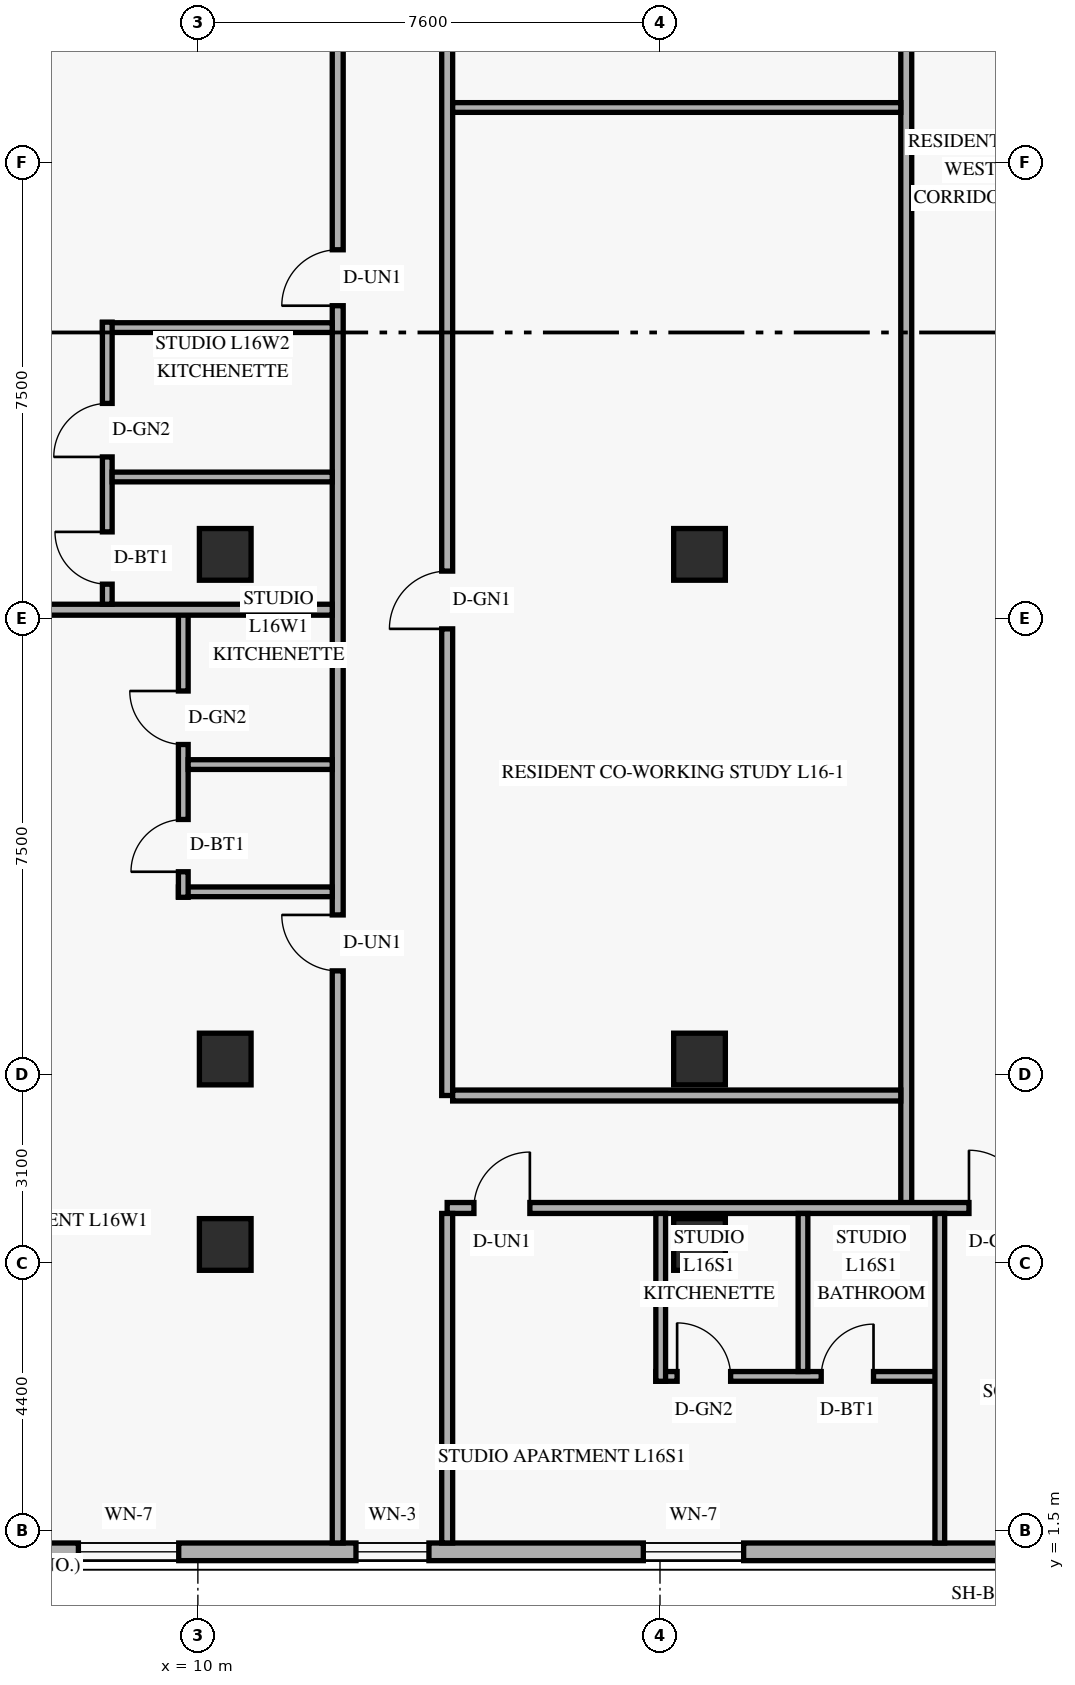
"""IFC4 building model, lengths in metres.
Left out: names, types, materials, properties, quantities, classifications, styles, units other than length and angle.
Written with IfcOpenShell. Run it as: python <this file> out.ifc"""

import sys

from ifc_helpers import new_model, si_unit, direction, frame, frame_2d, origin, origin_2d, place, context, subcontext, project, spatial, rectangle, extrude, element, fill, save


model = new_model("IFC4")
c1 = context("Model", 3, precision=1e-05, world=origin(), true_north=direction((0.0, 1.0)))
c2 = subcontext(c1, "Body", "Model", "MODEL_VIEW")
j1 = project(units=[si_unit("LENGTHUNIT", "METRE"), si_unit("PLANEANGLEUNIT", "RADIAN")], contexts=[c1])
p1 = place(None, origin())
s1 = spatial("IfcSite", under=j1, at=p1, CompositionType="ELEMENT")
p2 = place(p1, origin())
s2 = spatial("IfcBuilding", under=s1, at=p2, CompositionType="ELEMENT")
p3 = place(p2, frame((0.0, 0.0, 64.2)))
s3 = spatial("IfcBuildingStorey", under=s2, at=p3, CompositionType="ELEMENT", Elevation=64.2)
for number, where, z_axis, x_axis in (
    (1, (10.45, 6.2, 0.0), (0.0, 0.0, 1.0), (1.0, 0.0, 0.0)),
    (2, (10.45, 9.25, 0.0), (0.0, 0.0, 1.0), (1.0, 0.0, 0.0)),
    (3, (10.45, 17.55, 0.0), (0.0, 0.0, 1.0), (1.0, 0.0, 0.0)),
    (4, (18.25, 6.2, 0.0), (0.0, 0.0, 1.0), (1.0, 0.0, 0.0)),
    (5, (18.25, 9.25, 0.0), (0.0, 0.0, 1.0), (1.0, 0.0, 0.0)),
    (6, (18.25, 17.55, 0.0), (0.0, 0.0, 1.0), (1.0, 0.0, 0.0)),
):
    element("IfcColumn", number, at=place(p3, frame(where, z_axis=z_axis, x_axis=x_axis)), inside=s3, PredefinedType="COLUMN", context=c2, shape_type="SweptSolid", body=[
        extrude(rectangle(XDim=0.85, YDim=0.85, at=origin_2d()), origin(), (0.0, 0.0, 1.0), 3.6),
    ])
p4 = place(p3, frame((5.42, 1.145, 0.0), z_axis=(0.0, 0.0, 1.0), x_axis=(1.0, 0.0, 0.0)))
e7 = element("IfcWall", 7, at=p4, inside=s3, PredefinedType="SOLIDWALL", context=c2, shape_type="SweptSolid", body=[
    extrude(rectangle(XDim=39.56, YDim=0.29, at=frame_2d((19.78, 0.0))), origin(), (0.0, 0.0, 1.0), 3.36),
])
p5 = place(p4, frame((2.615, 0.0, 0.85)))
e8 = element("IfcOpeningElement", 8, at=p5, cuts=e7, PredefinedType="OPENING", context=c2, shape_type="SweptSolid", body=[
    extrude(rectangle(XDim=1.65, YDim=1.6, at=frame_2d((0.825, 0.8))), frame((0.0, 0.155, 0.0), z_axis=(0.0, -1.0, 0.0), x_axis=(1.0, 0.0, 0.0)), (0.0, 0.0, 1.0), 0.31),
])
p6 = place(p4, frame((7.18, 0.0, 0.85)))
e9 = element("IfcOpeningElement", 9, at=p6, cuts=e7, PredefinedType="OPENING", context=c2, shape_type="SweptSolid", body=[
    extrude(rectangle(XDim=1.2, YDim=1.5, at=frame_2d((0.6, 0.75))), frame((0.0, 0.155, 0.0), z_axis=(0.0, -1.0, 0.0), x_axis=(1.0, 0.0, 0.0)), (0.0, 0.0, 1.0), 0.31),
])
p7 = place(p4, frame((11.906, 0.0, 0.85)))
e10 = element("IfcOpeningElement", 10, at=p7, cuts=e7, PredefinedType="OPENING", context=c2, shape_type="SweptSolid", body=[
    extrude(rectangle(XDim=1.65, YDim=1.6, at=frame_2d((0.825, 0.8))), frame((0.0, 0.155, 0.0), z_axis=(0.0, -1.0, 0.0), x_axis=(1.0, 0.0, 0.0)), (0.0, 0.0, 1.0), 0.31),
])
p8 = place(p4, frame((18.515, 0.0, 0.85)))
e11 = element("IfcOpeningElement", 11, at=p8, cuts=e7, PredefinedType="OPENING", context=c2, shape_type="SweptSolid", body=[
    extrude(rectangle(XDim=1.65, YDim=1.6, at=frame_2d((0.825, 0.8))), frame((0.0, 0.155, 0.0), z_axis=(0.0, -1.0, 0.0), x_axis=(1.0, 0.0, 0.0)), (0.0, 0.0, 1.0), 0.31),
])
p9 = place(p4, frame((25.124, 0.0, 0.85)))
e12 = element("IfcOpeningElement", 12, at=p9, cuts=e7, PredefinedType="OPENING", context=c2, shape_type="SweptSolid", body=[
    extrude(rectangle(XDim=1.65, YDim=1.6, at=frame_2d((0.825, 0.8))), frame((0.0, 0.155, 0.0), z_axis=(0.0, -1.0, 0.0), x_axis=(1.0, 0.0, 0.0)), (0.0, 0.0, 1.0), 0.31),
])
p10 = place(p4, frame((30.465, 0.0, 0.85)))
e13 = element("IfcOpeningElement", 13, at=p10, cuts=e7, PredefinedType="OPENING", context=c2, shape_type="SweptSolid", body=[
    extrude(rectangle(XDim=1.2, YDim=1.5, at=frame_2d((0.6, 0.75))), frame((0.0, 0.155, 0.0), z_axis=(0.0, -1.0, 0.0), x_axis=(1.0, 0.0, 0.0)), (0.0, 0.0, 1.0), 0.31),
])
p11 = place(p4, frame((35.02, 0.0, 0.85)))
e14 = element("IfcOpeningElement", 14, at=p11, cuts=e7, PredefinedType="OPENING", context=c2, shape_type="SweptSolid", body=[
    extrude(rectangle(XDim=1.65, YDim=1.6, at=frame_2d((0.825, 0.8))), frame((0.0, 0.155, 0.0), z_axis=(0.0, -1.0, 0.0), x_axis=(1.0, 0.0, 0.0)), (0.0, 0.0, 1.0), 0.31),
])
p12 = place(p3, frame((21.65, 6.8, 0.0), z_axis=(0.0, 0.0, 1.0), x_axis=(0.0, 1.0, 0.0)))
e15 = element("IfcWall", 15, at=p12, inside=s3, PredefinedType="STANDARD", context=c2, shape_type="SweptSolid", body=[
    extrude(rectangle(XDim=34.4, YDim=0.18, at=frame_2d((17.2, 0.0))), origin(), (0.0, 0.0, 1.0), 2.649),
])
p13 = place(p3, frame((14.1, 6.8, 0.0), z_axis=(0.0, 0.0, 1.0), x_axis=(1.0, 0.0, 0.0)))
e16 = element("IfcWall", 16, at=p13, inside=s3, PredefinedType="STANDARD", context=c2, shape_type="SweptSolid", body=[
    extrude(rectangle(XDim=21.32, YDim=0.18, at=frame_2d((10.66, 0.0))), origin(), (0.0, 0.0, 1.0), 2.649),
])
p14 = place(p13, frame((0.44, 0.0, 0.0)))
e17 = element("IfcOpeningElement", 17, at=p14, cuts=e16, PredefinedType="OPENING", context=c2, shape_type="SweptSolid", body=[
    extrude(rectangle(XDim=0.92, YDim=2.15, at=frame_2d((0.46, 1.075))), frame((0.0, 0.1, 0.0), z_axis=(0.0, -1.0, 0.0), x_axis=(1.0, 0.0, 0.0)), (0.0, 0.0, 1.0), 0.2),
])
p15 = place(p13, frame((8.582, 0.0, 0.0)))
e18 = element("IfcOpeningElement", 18, at=p15, cuts=e16, PredefinedType="OPENING", context=c2, shape_type="SweptSolid", body=[
    extrude(rectangle(XDim=0.95, YDim=2.15, at=frame_2d((0.475, 1.075))), frame((0.0, 0.1, 0.0), z_axis=(0.0, -1.0, 0.0), x_axis=(1.0, 0.0, 0.0)), (0.0, 0.0, 1.0), 0.2),
])
p16 = place(p13, frame((13.658, 0.0, 0.0)))
e19 = element("IfcOpeningElement", 19, at=p16, cuts=e16, PredefinedType="OPENING", context=c2, shape_type="SweptSolid", body=[
    extrude(rectangle(XDim=0.92, YDim=2.15, at=frame_2d((0.46, 1.075))), frame((0.0, 0.1, 0.0), z_axis=(0.0, -1.0, 0.0), x_axis=(1.0, 0.0, 0.0)), (0.0, 0.0, 1.0), 0.2),
])
p17 = place(p3, frame((12.3, 1.29, 0.0), z_axis=(0.0, 0.0, 1.0), x_axis=(0.0, 1.0, 0.0)))
e20 = element("IfcWall", 20, at=p17, inside=s3, PredefinedType="STANDARD", context=c2, shape_type="SweptSolid", body=[
    extrude(rectangle(XDim=45.42, YDim=0.18, at=frame_2d((22.71, 0.0))), origin(), (0.0, 0.0, 1.0), 2.649),
])
p18 = place(p17, frame((9.41, 0.0, 0.0)))
e21 = element("IfcOpeningElement", 21, at=p18, cuts=e20, PredefinedType="OPENING", context=c2, shape_type="SweptSolid", body=[
    extrude(rectangle(XDim=0.92, YDim=2.15, at=frame_2d((0.46, 1.075))), frame((0.0, 0.1, 0.0), z_axis=(0.0, -1.0, 0.0), x_axis=(1.0, 0.0, 0.0)), (0.0, 0.0, 1.0), 0.2),
])
p19 = place(p17, frame((20.35, 0.0, 0.0)))
e22 = element("IfcOpeningElement", 22, at=p19, cuts=e20, PredefinedType="OPENING", context=c2, shape_type="SweptSolid", body=[
    extrude(rectangle(XDim=0.92, YDim=2.15, at=frame_2d((0.46, 1.075))), frame((0.0, 0.1, 0.0), z_axis=(0.0, -1.0, 0.0), x_axis=(1.0, 0.0, 0.0)), (0.0, 0.0, 1.0), 0.2),
])
p20 = place(p17, frame((35.99, 0.0, 0.0)))
e23 = element("IfcOpeningElement", 23, at=p20, cuts=e20, PredefinedType="OPENING", context=c2, shape_type="SweptSolid", body=[
    extrude(rectangle(XDim=0.92, YDim=2.15, at=frame_2d((0.46, 1.075))), frame((0.0, 0.1, 0.0), z_axis=(0.0, -1.0, 0.0), x_axis=(1.0, 0.0, 0.0)), (0.0, 0.0, 1.0), 0.2),
])
p21 = place(p3, frame((14.1, 8.65, 0.0), z_axis=(0.0, 0.0, 1.0), x_axis=(0.0, 1.0, 0.0)))
e24 = element("IfcWall", 24, at=p21, inside=s3, PredefinedType="STANDARD", context=c2, shape_type="SweptSolid", body=[
    extrude(rectangle(XDim=30.7, YDim=0.18, at=frame_2d((15.35, 0.0))), origin(), (0.0, 0.0, 1.0), 2.649),
])
p22 = place(p21, frame((7.675, 0.0, 0.0)))
e25 = element("IfcOpeningElement", 25, at=p22, cuts=e24, PredefinedType="OPENING", context=c2, shape_type="SweptSolid", body=[
    extrude(rectangle(XDim=0.95, YDim=2.15, at=frame_2d((0.475, 1.075))), frame((0.0, 0.1, 0.0), z_axis=(0.0, -1.0, 0.0), x_axis=(1.0, 0.0, 0.0)), (0.0, 0.0, 1.0), 0.2),
])
p23 = place(p21, frame((23.025, 0.0, 0.0)))
e26 = element("IfcOpeningElement", 26, at=p23, cuts=e24, PredefinedType="OPENING", context=c2, shape_type="SweptSolid", body=[
    extrude(rectangle(XDim=0.95, YDim=2.15, at=frame_2d((0.475, 1.075))), frame((0.0, 0.1, 0.0), z_axis=(0.0, -1.0, 0.0), x_axis=(1.0, 0.0, 0.0)), (0.0, 0.0, 1.0), 0.2),
])
p24 = place(p3, frame((14.19, 8.65, 0.0), z_axis=(0.0, 0.0, 1.0), x_axis=(1.0, 0.0, 0.0)))
e27 = element("IfcWall", 27, at=p24, inside=s3, PredefinedType="STANDARD", context=c2, shape_type="SweptSolid", body=[
    extrude(rectangle(XDim=7.37, YDim=0.18, at=frame_2d((3.685, 0.0))), origin(), (0.0, 0.0, 1.0), 2.649),
])
p25 = place(p3, frame((14.1, 1.29, 0.0), z_axis=(0.0, 0.0, 1.0), x_axis=(0.0, 1.0, 0.0)))
e28 = element("IfcWall", 28, at=p25, inside=s3, PredefinedType="PARTITIONING", context=c2, shape_type="SweptSolid", body=[
    extrude(rectangle(XDim=5.42, YDim=0.18, at=frame_2d((2.71, 0.0))), origin(), (0.0, 0.0, 1.0), 2.809),
])
p26 = place(p3, frame((9.68, 12.0, 0.0), z_axis=(0.0, 0.0, 1.0), x_axis=(1.0, 0.0, 0.0)))
e29 = element("IfcWall", 29, at=p26, inside=s3, PredefinedType="PLUMBINGWALL", context=c2, shape_type="SweptSolid", body=[
    extrude(rectangle(XDim=2.53, YDim=0.16, at=frame_2d((1.265, 0.0))), origin(), (0.0, 0.0, 1.0), 2.649),
])
p27 = place(p3, frame((9.76, 11.91, 0.0), z_axis=(0.0, 0.0, 1.0), x_axis=(0.0, 1.0, 0.0)))
e30 = element("IfcWall", 30, at=p27, inside=s3, PredefinedType="PLUMBINGWALL", context=c2, shape_type="SweptSolid", body=[
    extrude(rectangle(XDim=4.73, YDim=0.16, at=frame_2d((2.365, 0.0))), origin(), (0.0, 0.0, 1.0), 2.932),
])
p28 = place(p27, frame((0.42, 0.0, 0.0)))
e31 = element("IfcOpeningElement", 31, at=p28, cuts=e30, PredefinedType="OPENING", context=c2, shape_type="SweptSolid", body=[
    extrude(rectangle(XDim=0.86, YDim=2.12, at=frame_2d((0.43, 1.06))), frame((0.0, 0.09, 0.0), z_axis=(0.0, -1.0, 0.0), x_axis=(1.0, 0.0, 0.0)), (0.0, 0.0, 1.0), 0.18),
])
p29 = place(p27, frame((2.513, 0.0, 0.0)))
e32 = element("IfcOpeningElement", 32, at=p29, cuts=e30, PredefinedType="OPENING", context=c2, shape_type="SweptSolid", body=[
    extrude(rectangle(XDim=0.88, YDim=2.12, at=frame_2d((0.44, 1.06))), frame((0.0, 0.09, 0.0), z_axis=(0.0, -1.0, 0.0), x_axis=(1.0, 0.0, 0.0)), (0.0, 0.0, 1.0), 0.18),
])
p30 = place(p3, frame((9.84, 14.093, 0.0), z_axis=(0.0, 0.0, 1.0), x_axis=(1.0, 0.0, 0.0)))
e33 = element("IfcWall", 33, at=p30, inside=s3, PredefinedType="PLUMBINGWALL", context=c2, shape_type="SweptSolid", body=[
    extrude(rectangle(XDim=2.37, YDim=0.16, at=frame_2d((1.185, 0.0))), origin(), (0.0, 0.0, 1.0), 2.649),
])
p31 = place(p3, frame((2.09, 16.64, 0.0), z_axis=(0.0, 0.0, 1.0), x_axis=(1.0, 0.0, 0.0)))
e34 = element("IfcWall", 34, at=p31, inside=s3, PredefinedType="PARTITIONING", context=c2, shape_type="SweptSolid", body=[
    extrude(rectangle(XDim=10.12, YDim=0.18, at=frame_2d((5.06, 0.0))), origin(), (0.0, 0.0, 1.0), 2.649),
])
p32 = place(p3, frame((8.43, 21.28, 0.0), z_axis=(0.0, 0.0, 1.0), x_axis=(1.0, 0.0, 0.0)))
e35 = element("IfcWall", 35, at=p32, inside=s3, PredefinedType="PLUMBINGWALL", context=c2, shape_type="SweptSolid", body=[
    extrude(rectangle(XDim=3.78, YDim=0.16, at=frame_2d((1.89, 0.0))), origin(), (0.0, 0.0, 1.0), 2.649),
])
p33 = place(p3, frame((8.51, 16.73, 0.0), z_axis=(0.0, 0.0, 1.0), x_axis=(0.0, 1.0, 0.0)))
e36 = element("IfcWall", 36, at=p33, inside=s3, PredefinedType="PLUMBINGWALL", context=c2, shape_type="SweptSolid", body=[
    extrude(rectangle(XDim=4.64, YDim=0.16, at=frame_2d((2.32, 0.0))), origin(), (0.0, 0.0, 1.0), 2.649),
])
p34 = place(p33, frame((0.33, 0.0, 0.0)))
e37 = element("IfcOpeningElement", 37, at=p34, cuts=e36, PredefinedType="OPENING", context=c2, shape_type="SweptSolid", body=[
    extrude(rectangle(XDim=0.86, YDim=2.12, at=frame_2d((0.43, 1.06))), frame((0.0, 0.09, 0.0), z_axis=(0.0, -1.0, 0.0), x_axis=(1.0, 0.0, 0.0)), (0.0, 0.0, 1.0), 0.18),
])
p35 = place(p33, frame((2.423, 0.0, 0.0)))
e38 = element("IfcOpeningElement", 38, at=p35, cuts=e36, PredefinedType="OPENING", context=c2, shape_type="SweptSolid", body=[
    extrude(rectangle(XDim=0.88, YDim=2.12, at=frame_2d((0.44, 1.06))), frame((0.0, 0.09, 0.0), z_axis=(0.0, -1.0, 0.0), x_axis=(1.0, 0.0, 0.0)), (0.0, 0.0, 1.0), 0.18),
])
p36 = place(p3, frame((8.59, 18.823, 0.0), z_axis=(0.0, 0.0, 1.0), x_axis=(1.0, 0.0, 0.0)))
e39 = element("IfcWall", 39, at=p36, inside=s3, PredefinedType="PLUMBINGWALL", context=c2, shape_type="SweptSolid", body=[
    extrude(rectangle(XDim=3.62, YDim=0.16, at=frame_2d((1.81, 0.0))), origin(), (0.0, 0.0, 1.0), 2.649),
])
p37 = place(p3, frame((14.19, 24.9, 0.0), z_axis=(0.0, 0.0, 1.0), x_axis=(1.0, 0.0, 0.0)))
e40 = element("IfcWall", 40, at=p37, inside=s3, PredefinedType="PARTITIONING", context=c2, shape_type="SweptSolid", body=[
    extrude(rectangle(XDim=7.37, YDim=0.16, at=frame_2d((3.685, 0.0))), origin(), (0.0, 0.0, 1.0), 2.649),
])
p38 = place(p3, frame((17.531, 4.03, 0.0), z_axis=(0.0, 0.0, 1.0), x_axis=(1.0, 0.0, 0.0)))
e41 = element("IfcWall", 41, at=p38, inside=s3, PredefinedType="PLUMBINGWALL", context=c2, shape_type="SweptSolid", body=[
    extrude(rectangle(XDim=4.67, YDim=0.16, at=frame_2d((2.335, 0.0))), origin(), (0.0, 0.0, 1.0), 3.36),
])
p39 = place(p38, frame((0.35, 0.0, 0.0)))
e42 = element("IfcOpeningElement", 42, at=p39, cuts=e41, PredefinedType="OPENING", context=c2, shape_type="SweptSolid", body=[
    extrude(rectangle(XDim=0.88, YDim=2.12, at=frame_2d((0.44, 1.06))), frame((0.0, 0.09, 0.0), z_axis=(0.0, -1.0, 0.0), x_axis=(1.0, 0.0, 0.0)), (0.0, 0.0, 1.0), 0.18),
])
p40 = place(p38, frame((2.72, 0.0, 0.0)))
e43 = element("IfcOpeningElement", 43, at=p40, cuts=e41, PredefinedType="OPENING", context=c2, shape_type="SweptSolid", body=[
    extrude(rectangle(XDim=0.86, YDim=2.12, at=frame_2d((0.43, 1.06))), frame((0.0, 0.09, 0.0), z_axis=(0.0, -1.0, 0.0), x_axis=(1.0, 0.0, 0.0)), (0.0, 0.0, 1.0), 0.18),
])
p41 = place(p3, frame((17.612, 3.95, 0.0), z_axis=(0.0, 0.0, 1.0), x_axis=(0.0, 1.0, 0.0)))
e44 = element("IfcWall", 44, at=p41, inside=s3, PredefinedType="PLUMBINGWALL", context=c2, shape_type="SweptSolid", body=[
    extrude(rectangle(XDim=2.76, YDim=0.16, at=frame_2d((1.38, 0.0))), origin(), (0.0, 0.0, 1.0), 2.809),
])
p42 = place(p3, frame((19.952, 4.11, 0.0), z_axis=(0.0, 0.0, 1.0), x_axis=(0.0, 1.0, 0.0)))
e45 = element("IfcWall", 45, at=p42, inside=s3, PredefinedType="PLUMBINGWALL", context=c2, shape_type="SweptSolid", body=[
    extrude(rectangle(XDim=2.6, YDim=0.16, at=frame_2d((1.3, 0.0))), origin(), (0.0, 0.0, 1.0), 2.809),
])
p43 = place(p3, frame((22.202, 1.29, 0.0), z_axis=(0.0, 0.0, 1.0), x_axis=(0.0, 1.0, 0.0)))
e46 = element("IfcWall", 46, at=p43, inside=s3, PredefinedType="PARTITIONING", context=c2, shape_type="SweptSolid", body=[
    extrude(rectangle(XDim=5.42, YDim=0.16, at=frame_2d((2.71, 0.0))), origin(), (0.0, 0.0, 1.0), 2.809),
])
p44 = place(p5, origin())
e47 = element("IfcWindow", 47, at=p44, inside=s3, PartitioningType="SINGLE_PANEL", PredefinedType="WINDOW", context=c2, shape_type="SweptSolid", body=[
    extrude(rectangle(XDim=1.65, YDim=1.6, at=frame_2d((0.825, 0.8))), frame((0.0, 0.03, 0.0), z_axis=(0.0, -1.0, 0.0), x_axis=(1.0, 0.0, 0.0)), (0.0, 0.0, 1.0), 0.06),
])
fill(e8, e47)
p45 = place(p6, origin())
e48 = element("IfcWindow", 48, at=p45, inside=s3, PartitioningType="SINGLE_PANEL", PredefinedType="WINDOW", context=c2, shape_type="SweptSolid", body=[
    extrude(rectangle(XDim=1.2, YDim=1.5, at=frame_2d((0.6, 0.75))), frame((0.0, 0.03, 0.0), z_axis=(0.0, -1.0, 0.0), x_axis=(1.0, 0.0, 0.0)), (0.0, 0.0, 1.0), 0.06),
])
fill(e9, e48)
p46 = place(p7, origin())
e49 = element("IfcWindow", 49, at=p46, inside=s3, PartitioningType="SINGLE_PANEL", PredefinedType="WINDOW", context=c2, shape_type="SweptSolid", body=[
    extrude(rectangle(XDim=1.65, YDim=1.6, at=frame_2d((0.825, 0.8))), frame((0.0, 0.03, 0.0), z_axis=(0.0, -1.0, 0.0), x_axis=(1.0, 0.0, 0.0)), (0.0, 0.0, 1.0), 0.06),
])
fill(e10, e49)
p47 = place(p18, origin())
e50 = element("IfcDoor", 50, at=p47, inside=s3, OperationType="SINGLE_SWING_RIGHT", PredefinedType="DOOR", context=c2, shape_type="SweptSolid", body=[
    extrude(rectangle(XDim=0.92, YDim=2.15, at=frame_2d((0.46, 1.075))), frame((0.0, 0.025, 0.0), z_axis=(0.0, -1.0, 0.0), x_axis=(1.0, 0.0, 0.0)), (0.0, 0.0, 1.0), 0.05),
])
fill(e21, e50)
p48 = place(p28, origin())
e51 = element("IfcDoor", 51, at=p48, inside=s3, OperationType="SINGLE_SWING_LEFT", PredefinedType="DOOR", context=c2, shape_type="SweptSolid", body=[
    extrude(rectangle(XDim=0.86, YDim=2.12, at=frame_2d((0.43, 1.06))), frame((0.0, 0.025, 0.0), z_axis=(0.0, -1.0, 0.0), x_axis=(1.0, 0.0, 0.0)), (0.0, 0.0, 1.0), 0.05),
])
fill(e31, e51)
p49 = place(p29, origin())
e52 = element("IfcDoor", 52, at=p49, inside=s3, OperationType="SINGLE_SWING_RIGHT", PredefinedType="DOOR", context=c2, shape_type="SweptSolid", body=[
    extrude(rectangle(XDim=0.88, YDim=2.12, at=frame_2d((0.44, 1.06))), frame((0.0, 0.025, 0.0), z_axis=(0.0, -1.0, 0.0), x_axis=(1.0, 0.0, 0.0)), (0.0, 0.0, 1.0), 0.05),
])
fill(e32, e52)
p50 = place(p19, origin())
e53 = element("IfcDoor", 53, at=p50, inside=s3, OperationType="SINGLE_SWING_LEFT", PredefinedType="DOOR", context=c2, shape_type="SweptSolid", body=[
    extrude(rectangle(XDim=0.92, YDim=2.15, at=frame_2d((0.46, 1.075))), frame((0.0, 0.025, 0.0), z_axis=(0.0, -1.0, 0.0), x_axis=(1.0, 0.0, 0.0)), (0.0, 0.0, 1.0), 0.05),
])
fill(e22, e53)
p51 = place(p34, origin())
e54 = element("IfcDoor", 54, at=p51, inside=s3, OperationType="SINGLE_SWING_RIGHT", PredefinedType="DOOR", context=c2, shape_type="SweptSolid", body=[
    extrude(rectangle(XDim=0.86, YDim=2.12, at=frame_2d((0.43, 1.06))), frame((0.0, 0.025, 0.0), z_axis=(0.0, -1.0, 0.0), x_axis=(1.0, 0.0, 0.0)), (0.0, 0.0, 1.0), 0.05),
])
fill(e37, e54)
p52 = place(p35, origin())
e55 = element("IfcDoor", 55, at=p52, inside=s3, OperationType="SINGLE_SWING_LEFT", PredefinedType="DOOR", context=c2, shape_type="SweptSolid", body=[
    extrude(rectangle(XDim=0.88, YDim=2.12, at=frame_2d((0.44, 1.06))), frame((0.0, 0.025, 0.0), z_axis=(0.0, -1.0, 0.0), x_axis=(1.0, 0.0, 0.0)), (0.0, 0.0, 1.0), 0.05),
])
fill(e38, e55)
p53 = place(p22, origin())
e56 = element("IfcDoor", 56, at=p53, inside=s3, OperationType="SINGLE_SWING_LEFT", PredefinedType="DOOR", context=c2, shape_type="SweptSolid", body=[
    extrude(rectangle(XDim=0.95, YDim=2.15, at=frame_2d((0.475, 1.075))), frame((0.0, 0.025, 0.0), z_axis=(0.0, -1.0, 0.0), x_axis=(1.0, 0.0, 0.0)), (0.0, 0.0, 1.0), 0.05),
])
fill(e25, e56)
p54 = place(p14, origin())
e57 = element("IfcDoor", 57, at=p54, inside=s3, OperationType="SINGLE_SWING_RIGHT", PredefinedType="DOOR", context=c2, shape_type="SweptSolid", body=[
    extrude(rectangle(XDim=0.92, YDim=2.15, at=frame_2d((0.46, 1.075))), frame((0.0, 0.025, 0.0), z_axis=(0.0, -1.0, 0.0), x_axis=(1.0, 0.0, 0.0)), (0.0, 0.0, 1.0), 0.05),
])
fill(e17, e57)
p55 = place(p39, origin())
e58 = element("IfcDoor", 58, at=p55, inside=s3, OperationType="SINGLE_SWING_LEFT", PredefinedType="DOOR", context=c2, shape_type="SweptSolid", body=[
    extrude(rectangle(XDim=0.88, YDim=2.12, at=frame_2d((0.44, 1.06))), frame((0.0, 0.025, 0.0), z_axis=(0.0, -1.0, 0.0), x_axis=(1.0, 0.0, 0.0)), (0.0, 0.0, 1.0), 0.05),
])
fill(e42, e58)
p56 = place(p40, origin())
e59 = element("IfcDoor", 59, at=p56, inside=s3, OperationType="SINGLE_SWING_RIGHT", PredefinedType="DOOR", context=c2, shape_type="SweptSolid", body=[
    extrude(rectangle(XDim=0.86, YDim=2.12, at=frame_2d((0.43, 1.06))), frame((0.0, 0.025, 0.0), z_axis=(0.0, -1.0, 0.0), x_axis=(1.0, 0.0, 0.0)), (0.0, 0.0, 1.0), 0.05),
])
fill(e43, e59)
p57 = place(p15, origin())
e60 = element("IfcDoor", 60, at=p57, inside=s3, OperationType="SINGLE_SWING_LEFT", PredefinedType="DOOR", context=c2, shape_type="SweptSolid", body=[
    extrude(rectangle(XDim=0.95, YDim=2.15, at=frame_2d((0.475, 1.075))), frame((0.0, 0.025, 0.0), z_axis=(0.0, -1.0, 0.0), x_axis=(1.0, 0.0, 0.0)), (0.0, 0.0, 1.0), 0.05),
])
fill(e18, e60)
save(model, sys.argv[1])
